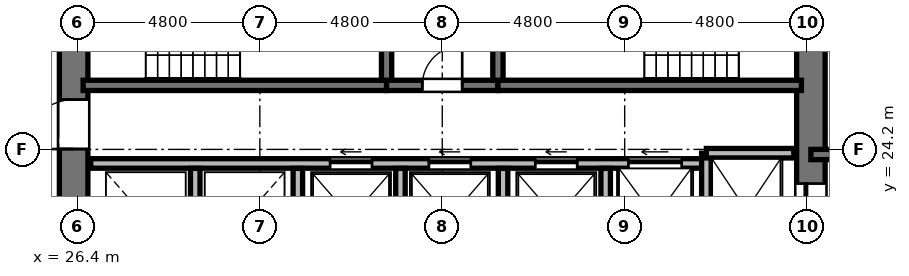
"""IFC4 building model, lengths in metres.
Left out: names, types, materials, properties, quantities, classifications, styles, units other than length and angle.
Written with IfcOpenShell. Run it as: python <this file> out.ifc"""

import sys

from ifc_helpers import new_model, si_unit, direction, frame, frame_2d, origin, place, context, subcontext, project, spatial, rectangle, extrude, element, fill, save


model = new_model("IFC4")
c1 = context("Model", 3, precision=1e-05, world=origin(), true_north=direction((0.0, 1.0)))
c2 = subcontext(c1, "Body", "Model", "MODEL_VIEW")
j1 = project(units=[si_unit("LENGTHUNIT", "METRE"), si_unit("PLANEANGLEUNIT", "RADIAN")], contexts=[c1])
p1 = place(None, origin())
s1 = spatial("IfcSite", under=j1, at=p1, CompositionType="ELEMENT")
p2 = place(p1, origin())
s2 = spatial("IfcBuilding", under=s1, at=p2, CompositionType="ELEMENT")
p3 = place(p2, frame((0.0, 0.0, 132.816)))
s3 = spatial("IfcBuildingStorey", under=s2, at=p3, CompositionType="ELEMENT", Elevation=132.816)
p4 = place(p3, frame((26.3, 20.95, 0.0), z_axis=(0.0, 0.0, 1.0), x_axis=(0.0, 1.0, 0.0)))
e1 = element("IfcWall", 1, at=p4, inside=s3, PredefinedType="SHEAR", context=c2, shape_type="SweptSolid", body=[
    extrude(rectangle(XDim=14.1, YDim=0.75, at=frame_2d((7.05, 0.0))), origin(), (0.0, 0.0, 1.0), 5.472),
])
p5 = place(p4, frame((6.5, 0.0, 0.0)))
e2 = element("IfcOpeningElement", 2, at=p5, cuts=e1, PredefinedType="OPENING", context=c2, shape_type="SweptSolid", body=[
    extrude(rectangle(XDim=1.2, YDim=2.15, at=frame_2d((0.6, 1.075))), frame((0.0, 0.385, 0.0), z_axis=(0.0, -1.0, 0.0), x_axis=(1.0, 0.0, 0.0)), (0.0, 0.0, 1.0), 0.77),
])
p6 = place(p4, frame((9.6, 0.0, 0.0)))
e3 = element("IfcOpeningElement", 3, at=p6, cuts=e1, PredefinedType="OPENING", context=c2, shape_type="SweptSolid", body=[
    extrude(rectangle(XDim=1.3, YDim=2.2, at=frame_2d((0.65, 1.1))), frame((0.0, 0.385, 0.0), z_axis=(0.0, -1.0, 0.0), x_axis=(1.0, 0.0, 0.0)), (0.0, 0.0, 1.0), 0.77),
])
p7 = place(p4, frame((3.26, 0.0, 0.0)))
e4 = element("IfcOpeningElement", 4, at=p7, cuts=e1, PredefinedType="OPENING", context=c2, shape_type="SweptSolid", body=[
    extrude(rectangle(XDim=1.3, YDim=2.2, at=frame_2d((0.65, 1.1))), frame((0.0, 0.385, 0.0), z_axis=(0.0, -1.0, 0.0), x_axis=(1.0, 0.0, 0.0)), (0.0, 0.0, 1.0), 0.77),
])
p8 = place(p3, frame((45.7, 20.95, 0.0), z_axis=(0.0, 0.0, 1.0), x_axis=(0.0, 1.0, 0.0)))
e5 = element("IfcWall", 5, at=p8, inside=s3, PredefinedType="SHEAR", context=c2, shape_type="SweptSolid", body=[
    extrude(rectangle(XDim=14.1, YDim=0.75, at=frame_2d((7.05, 0.0))), origin(), (0.0, 0.0, 1.0), 5.472),
])
p9 = place(p8, frame((11.75, 0.0, 0.0)))
e6 = element("IfcOpeningElement", 6, at=p9, cuts=e5, PredefinedType="OPENING", context=c2, shape_type="SweptSolid", body=[
    extrude(rectangle(XDim=1.4, YDim=2.3, at=frame_2d((0.7, 1.15))), frame((0.0, 0.385, 0.0), z_axis=(0.0, -1.0, 0.0), x_axis=(1.0, 0.0, 0.0)), (0.0, 0.0, 1.0), 0.77),
])
p10 = place(p8, frame((0.95, 0.0, 0.0)))
e7 = element("IfcOpeningElement", 7, at=p10, cuts=e5, PredefinedType="OPENING", context=c2, shape_type="SweptSolid", body=[
    extrude(rectangle(XDim=1.4, YDim=2.3, at=frame_2d((0.7, 1.15))), frame((0.0, 0.385, 0.0), z_axis=(0.0, -1.0, 0.0), x_axis=(1.0, 0.0, 0.0)), (0.0, 0.0, 1.0), 0.77),
])
p11 = place(p3, frame((26.55, 25.885, 0.0), z_axis=(0.0, 0.0, 1.0), x_axis=(1.0, 0.0, 0.0)))
e8 = element("IfcWall", 8, at=p11, inside=s3, PredefinedType="SHEAR", context=c2, shape_type="SweptSolid", body=[
    extrude(rectangle(XDim=7.985, YDim=0.27, at=frame_2d((3.992, 0.0))), origin(), (0.0, 0.0, 1.0), 5.472),
])
p12 = place(p3, frame((34.535, 25.885, 0.0), z_axis=(0.0, 0.0, 1.0), x_axis=(1.0, 0.0, 0.0)))
e9 = element("IfcWall", 9, at=p12, inside=s3, PredefinedType="SHEAR", context=c2, shape_type="SweptSolid", body=[
    extrude(rectangle(XDim=2.93, YDim=0.27, at=frame_2d((1.465, 0.0))), origin(), (0.0, 0.0, 1.0), 5.472),
])
p13 = place(p12, frame((0.94, 0.0, 0.0)))
e10 = element("IfcOpeningElement", 10, at=p13, cuts=e9, PredefinedType="OPENING", context=c2, shape_type="SweptSolid", body=[
    extrude(rectangle(XDim=1.05, YDim=2.15, at=frame_2d((0.525, 1.075))), frame((0.0, 0.145, 0.0), z_axis=(0.0, -1.0, 0.0), x_axis=(1.0, 0.0, 0.0)), (0.0, 0.0, 1.0), 0.29),
])
p14 = place(p3, frame((37.465, 25.885, 0.0), z_axis=(0.0, 0.0, 1.0), x_axis=(1.0, 0.0, 0.0)))
e11 = element("IfcWall", 11, at=p14, inside=s3, PredefinedType="SHEAR", context=c2, shape_type="SweptSolid", body=[
    extrude(rectangle(XDim=7.985, YDim=0.27, at=frame_2d((3.992, 0.0))), origin(), (0.0, 0.0, 1.0), 5.472),
])
for number, where, z_axis, x_axis in (
    (12, (34.535, 26.02, 0.0), (0.0, 0.0, 1.0), (0.0, 1.0, 0.0)),
    (13, (37.465, 26.02, 0.0), (0.0, 0.0, 1.0), (0.0, 1.0, 0.0)),
):
    element("IfcWall", number, at=place(p3, frame(where, z_axis=z_axis, x_axis=x_axis)), inside=s3, PredefinedType="SHEAR", context=c2, shape_type="SweptSolid", body=[
        extrude(rectangle(XDim=4.08, YDim=0.27, at=frame_2d((2.04, 0.0))), origin(), (0.0, 0.0, 1.0), 5.472),
    ])
p15 = place(p3, frame((26.75, 23.83, 0.0), z_axis=(0.0, 0.0, 1.0), x_axis=(1.0, 0.0, 0.0)))
e14 = element("IfcWall", 14, at=p15, inside=s3, PredefinedType="SOLIDWALL", context=c2, shape_type="SweptSolid", body=[
    extrude(rectangle(XDim=16.2, YDim=0.25, at=frame_2d((8.1, 0.0))), origin(), (0.0, 0.0, 1.0), 5.022),
])
p16 = place(p15, frame((6.3, 0.0, 0.0)))
e15 = element("IfcOpeningElement", 15, at=p16, cuts=e14, PredefinedType="OPENING", context=c2, shape_type="SweptSolid", body=[
    extrude(rectangle(XDim=1.1, YDim=2.2, at=frame_2d((0.55, 1.1))), frame((0.0, 0.135, 0.0), z_axis=(0.0, -1.0, 0.0), x_axis=(1.0, 0.0, 0.0)), (0.0, 0.0, 1.0), 0.27),
])
p17 = place(p15, frame((8.9, 0.0, 0.0)))
e16 = element("IfcOpeningElement", 16, at=p17, cuts=e14, PredefinedType="OPENING", context=c2, shape_type="SweptSolid", body=[
    extrude(rectangle(XDim=1.1, YDim=2.2, at=frame_2d((0.55, 1.1))), frame((0.0, 0.135, 0.0), z_axis=(0.0, -1.0, 0.0), x_axis=(1.0, 0.0, 0.0)), (0.0, 0.0, 1.0), 0.27),
])
p18 = place(p15, frame((11.7, 0.0, 0.0)))
e17 = element("IfcOpeningElement", 17, at=p18, cuts=e14, PredefinedType="OPENING", context=c2, shape_type="SweptSolid", body=[
    extrude(rectangle(XDim=1.1, YDim=2.2, at=frame_2d((0.55, 1.1))), frame((0.0, 0.135, 0.0), z_axis=(0.0, -1.0, 0.0), x_axis=(1.0, 0.0, 0.0)), (0.0, 0.0, 1.0), 0.27),
])
p19 = place(p15, frame((14.15, 0.0, 0.0)))
e18 = element("IfcOpeningElement", 18, at=p19, cuts=e14, PredefinedType="OPENING", context=c2, shape_type="SweptSolid", body=[
    extrude(rectangle(XDim=1.4, YDim=2.3, at=frame_2d((0.7, 1.15))), frame((0.0, 0.135, 0.0), z_axis=(0.0, -1.0, 0.0), x_axis=(1.0, 0.0, 0.0)), (0.0, 0.0, 1.0), 0.27),
])
p20 = place(p3, frame((42.95, 20.9, 0.0), z_axis=(0.0, 0.0, 1.0), x_axis=(0.0, 1.0, 0.0)))
e19 = element("IfcWall", 19, at=p20, inside=s3, PredefinedType="SOLIDWALL", context=c2, shape_type="SweptSolid", body=[
    extrude(rectangle(XDim=3.2, YDim=0.25, at=frame_2d((1.6, 0.0))), origin(), (0.0, 0.0, 1.0), 5.022),
])
p21 = place(p3, frame((42.95, 24.1, 0.0), z_axis=(0.0, 0.0, 1.0), x_axis=(1.0, 0.0, 0.0)))
e20 = element("IfcWall", 20, at=p21, inside=s3, PredefinedType="SOLIDWALL", context=c2, shape_type="SweptSolid", body=[
    extrude(rectangle(XDim=2.3, YDim=0.25, at=frame_2d((1.15, 0.0))), origin(), (0.0, 0.0, 1.0), 5.022),
])
for number, where, z_axis, x_axis in (
    (21, (29.5, 20.9, 0.0), (0.0, 0.0, 1.0), (0.0, 1.0, 0.0)),
    (22, (32.2, 20.9, 0.0), (0.0, 0.0, 1.0), (0.0, 1.0, 0.0)),
    (23, (34.9, 20.9, 0.0), (0.0, 0.0, 1.0), (0.0, 1.0, 0.0)),
    (24, (37.6, 20.9, 0.0), (0.0, 0.0, 1.0), (0.0, 1.0, 0.0)),
    (25, (40.3, 20.9, 0.0), (0.0, 0.0, 1.0), (0.0, 1.0, 0.0)),
):
    element("IfcWall", number, at=place(p3, frame(where, z_axis=z_axis, x_axis=x_axis)), inside=s3, PredefinedType="SOLIDWALL", context=c2, shape_type="SweptSolid", body=[
        extrude(rectangle(XDim=2.8, YDim=0.25, at=frame_2d((1.4, 0.0))), origin(), (0.0, 0.0, 1.0), 5.022),
    ])
p22 = place(p3, frame((45.7, 24.065, 0.0), z_axis=(0.0, 0.0, 1.0), x_axis=(1.0, 0.0, 0.0)))
e26 = element("IfcWall", 26, at=p22, inside=s3, PredefinedType="SHEAR", context=c2, shape_type="SweptSolid", body=[
    extrude(rectangle(XDim=4.715, YDim=0.27, at=frame_2d((2.357, 0.0))), origin(), (0.0, 0.0, 1.0), 5.472),
])
p23 = place(p13, origin())
e27 = element("IfcDoor", 27, at=p23, inside=s3, OperationType="SINGLE_SWING_RIGHT", PredefinedType="DOOR", context=c2, shape_type="SweptSolid", body=[
    extrude(rectangle(XDim=1.05, YDim=2.15, at=frame_2d((0.525, 1.075))), frame((0.0, 0.025, 0.0), z_axis=(0.0, -1.0, 0.0), x_axis=(1.0, 0.0, 0.0)), (0.0, 0.0, 1.0), 0.05),
])
fill(e10, e27)
p24 = place(p7, origin())
e28 = element("IfcDoor", 28, at=p24, inside=s3, OperationType="SINGLE_SWING_LEFT", PredefinedType="DOOR", context=c2, shape_type="SweptSolid", body=[
    extrude(rectangle(XDim=1.3, YDim=2.2, at=frame_2d((0.65, 1.1))), frame((0.0, 0.025, 0.0), z_axis=(0.0, -1.0, 0.0), x_axis=(1.0, 0.0, 0.0)), (0.0, 0.0, 1.0), 0.05),
])
fill(e4, e28)
p25 = place(p16, origin())
e29 = element("IfcDoor", 29, at=p25, inside=s3, OperationType="SLIDING_TO_LEFT", PredefinedType="DOOR", context=c2, shape_type="SweptSolid", body=[
    extrude(rectangle(XDim=1.1, YDim=2.2, at=frame_2d((0.55, 1.1))), frame((0.0, 0.025, 0.0), z_axis=(0.0, -1.0, 0.0), x_axis=(1.0, 0.0, 0.0)), (0.0, 0.0, 1.0), 0.05),
])
fill(e15, e29)
p26 = place(p17, origin())
e30 = element("IfcDoor", 30, at=p26, inside=s3, OperationType="SLIDING_TO_LEFT", PredefinedType="DOOR", context=c2, shape_type="SweptSolid", body=[
    extrude(rectangle(XDim=1.1, YDim=2.2, at=frame_2d((0.55, 1.1))), frame((0.0, 0.025, 0.0), z_axis=(0.0, -1.0, 0.0), x_axis=(1.0, 0.0, 0.0)), (0.0, 0.0, 1.0), 0.05),
])
fill(e16, e30)
p27 = place(p18, origin())
e31 = element("IfcDoor", 31, at=p27, inside=s3, OperationType="SLIDING_TO_LEFT", PredefinedType="DOOR", context=c2, shape_type="SweptSolid", body=[
    extrude(rectangle(XDim=1.1, YDim=2.2, at=frame_2d((0.55, 1.1))), frame((0.0, 0.025, 0.0), z_axis=(0.0, -1.0, 0.0), x_axis=(1.0, 0.0, 0.0)), (0.0, 0.0, 1.0), 0.05),
])
fill(e17, e31)
p28 = place(p10, origin())
e32 = element("IfcDoor", 32, at=p28, inside=s3, OperationType="SLIDING_TO_LEFT", PredefinedType="DOOR", context=c2, shape_type="SweptSolid", body=[
    extrude(rectangle(XDim=1.4, YDim=2.3, at=frame_2d((0.7, 1.15))), frame((0.0, 0.025, 0.0), z_axis=(0.0, -1.0, 0.0), x_axis=(1.0, 0.0, 0.0)), (0.0, 0.0, 1.0), 0.05),
])
fill(e7, e32)
p29 = place(p19, origin())
e33 = element("IfcDoor", 33, at=p29, inside=s3, OperationType="SLIDING_TO_LEFT", PredefinedType="DOOR", context=c2, shape_type="SweptSolid", body=[
    extrude(rectangle(XDim=1.4, YDim=2.3, at=frame_2d((0.7, 1.15))), frame((0.0, 0.025, 0.0), z_axis=(0.0, -1.0, 0.0), x_axis=(1.0, 0.0, 0.0)), (0.0, 0.0, 1.0), 0.05),
])
fill(e18, e33)
save(model, sys.argv[1])
